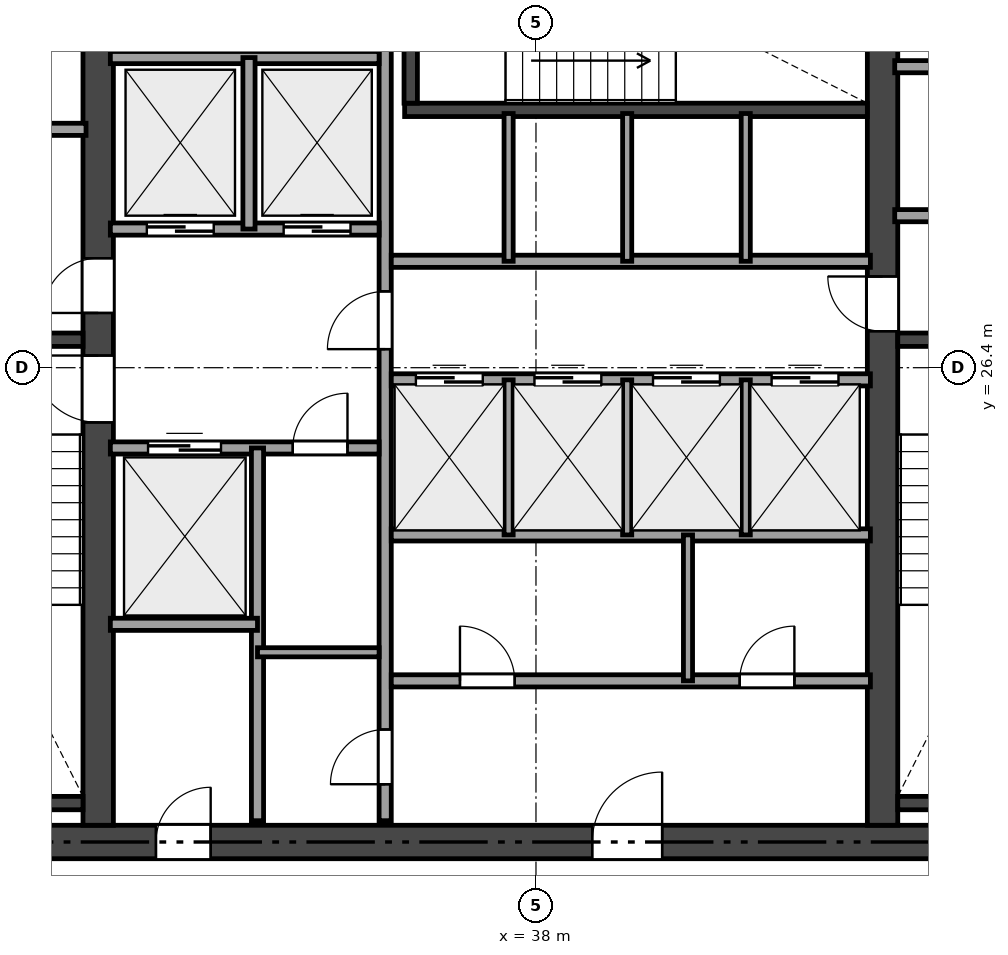
"""IFC4 building model, lengths in metres.
Left out: names, types, materials, properties, quantities, classifications, styles, units other than length and angle.
Written with IfcOpenShell. Run it as: python <this file> out.ifc"""

import sys

from ifc_helpers import new_model, si_unit, direction, frame, frame_2d, origin, place, context, subcontext, project, spatial, rectangle, extrude, element, fill, save


model = new_model("IFC4")
c1 = context("Model", 3, precision=1e-05, world=origin(), true_north=direction((0.0, 1.0)))
c2 = subcontext(c1, "Body", "Model", "MODEL_VIEW")
j1 = project(units=[si_unit("LENGTHUNIT", "METRE"), si_unit("PLANEANGLEUNIT", "RADIAN")], contexts=[c1])
p1 = place(None, origin())
s1 = spatial("IfcSite", under=j1, at=p1, CompositionType="ELEMENT")
p2 = place(p1, origin())
s2 = spatial("IfcBuilding", under=s1, at=p2, CompositionType="ELEMENT")
p3 = place(p2, frame((0.0, 0.0, 177.0)))
s3 = spatial("IfcBuildingStorey", under=s2, at=p3, CompositionType="ELEMENT", Elevation=177.0)
p4 = place(p3, frame((26.525, 18.6, 0.0), z_axis=(0.0, 0.0, 1.0), x_axis=(1.0, 0.0, 0.0)))
e1 = element("IfcWall", 1, at=p4, inside=s3, PredefinedType="SHEAR", context=c2, shape_type="SweptSolid", body=[
    extrude(rectangle(XDim=21.35, YDim=0.55, at=frame_2d((10.675, 0.0))), origin(), (0.0, 0.0, 1.0), 3.32),
])
p5 = place(p4, frame((12.4, 0.0, 0.0)))
e2 = element("IfcOpeningElement", 2, at=p5, cuts=e1, PredefinedType="OPENING", context=c2, shape_type="SweptSolid", body=[
    extrude(rectangle(XDim=1.15, YDim=2.15, at=frame_2d((0.575, 1.075))), frame((0.0, 0.285, 0.0), z_axis=(0.0, -1.0, 0.0), x_axis=(1.0, 0.0, 0.0)), (0.0, 0.0, 1.0), 0.57),
])
p6 = place(p4, frame((5.225, 0.0, 0.0)))
e3 = element("IfcOpeningElement", 3, at=p6, cuts=e1, PredefinedType="OPENING", context=c2, shape_type="SweptSolid", body=[
    extrude(rectangle(XDim=0.9, YDim=2.1, at=frame_2d((0.45, 1.05))), frame((0.0, 0.285, 0.0), z_axis=(0.0, -1.0, 0.0), x_axis=(1.0, 0.0, 0.0)), (0.0, 0.0, 1.0), 0.57),
])
p7 = place(p3, frame((30.8, 18.875, 0.0), z_axis=(0.0, 0.0, 1.0), x_axis=(0.0, 1.0, 0.0)))
e4 = element("IfcWall", 4, at=p7, inside=s3, PredefinedType="SHEAR", context=c2, shape_type="SweptSolid", body=[
    extrude(rectangle(XDim=15.05, YDim=0.5, at=frame_2d((7.525, 0.0))), origin(), (0.0, 0.0, 1.0), 3.32),
])
p8 = place(p7, frame((6.625, 0.0, 0.0)))
e5 = element("IfcOpeningElement", 5, at=p8, cuts=e4, PredefinedType="OPENING", context=c2, shape_type="SweptSolid", body=[
    extrude(rectangle(XDim=1.1, YDim=2.15, at=frame_2d((0.55, 1.075))), frame((0.0, 0.26, 0.0), z_axis=(0.0, -1.0, 0.0), x_axis=(1.0, 0.0, 0.0)), (0.0, 0.0, 1.0), 0.52),
])
p9 = place(p7, frame((8.425, 0.0, 0.0)))
e6 = element("IfcOpeningElement", 6, at=p9, cuts=e4, PredefinedType="OPENING", context=c2, shape_type="SweptSolid", body=[
    extrude(rectangle(XDim=0.9, YDim=2.1, at=frame_2d((0.45, 1.05))), frame((0.0, 0.26, 0.0), z_axis=(0.0, -1.0, 0.0), x_axis=(1.0, 0.0, 0.0)), (0.0, 0.0, 1.0), 0.52),
])
p10 = place(p3, frame((43.7, 18.875, 0.0), z_axis=(0.0, 0.0, 1.0), x_axis=(0.0, 1.0, 0.0)))
e7 = element("IfcWall", 7, at=p10, inside=s3, PredefinedType="SHEAR", context=c2, shape_type="SweptSolid", body=[
    extrude(rectangle(XDim=15.05, YDim=0.5, at=frame_2d((7.525, 0.0))), origin(), (0.0, 0.0, 1.0), 3.32),
])
p11 = place(p10, frame((8.125, 0.0, 0.0)))
e8 = element("IfcOpeningElement", 8, at=p11, cuts=e7, PredefinedType="OPENING", context=c2, shape_type="SweptSolid", body=[
    extrude(rectangle(XDim=0.9, YDim=2.1, at=frame_2d((0.45, 1.05))), frame((0.0, 0.26, 0.0), z_axis=(0.0, -1.0, 0.0), x_axis=(1.0, 0.0, 0.0)), (0.0, 0.0, 1.0), 0.52),
])
for number, where, z_axis, x_axis in (
    (9, (27.075, 26.86, 0.0), (0.0, 0.0, 1.0), (1.0, 0.0, 0.0)),
    (10, (27.075, 19.24, 0.0), (0.0, 0.0, 1.0), (1.0, 0.0, 0.0)),
):
    element("IfcWall", number, at=place(p3, frame(where, z_axis=z_axis, x_axis=x_axis)), inside=s3, PredefinedType="SHEAR", context=c2, shape_type="SweptSolid", body=[
        extrude(rectangle(XDim=3.475, YDim=0.22, at=frame_2d((1.738, 0.0))), origin(), (0.0, 0.0, 1.0), 3.32),
    ])
for number, where, z_axis, x_axis in (
    (11, (43.95, 26.86, 0.0), (0.0, 0.0, 1.0), (1.0, 0.0, 0.0)),
    (12, (43.95, 19.24, 0.0), (0.0, 0.0, 1.0), (1.0, 0.0, 0.0)),
):
    element("IfcWall", number, at=place(p3, frame(where, z_axis=z_axis, x_axis=x_axis)), inside=s3, PredefinedType="SHEAR", context=c2, shape_type="SweptSolid", body=[
        extrude(rectangle(XDim=3.375, YDim=0.22, at=frame_2d((1.688, 0.0))), origin(), (0.0, 0.0, 1.0), 3.32),
    ])
p12 = place(p3, frame((35.84, 30.64, 0.0), z_axis=(0.0, 0.0, 1.0), x_axis=(1.0, 0.0, 0.0)))
e13 = element("IfcWall", 13, at=p12, inside=s3, PredefinedType="SHEAR", context=c2, shape_type="SweptSolid", body=[
    extrude(rectangle(XDim=7.61, YDim=0.22, at=frame_2d((3.805, 0.0))), origin(), (0.0, 0.0, 1.0), 3.32),
])
p13 = place(p3, frame((35.94, 30.75, 0.0), z_axis=(0.0, 0.0, 1.0), x_axis=(0.0, 1.0, 0.0)))
e14 = element("IfcWall", 14, at=p13, inside=s3, PredefinedType="SHEAR", context=c2, shape_type="SweptSolid", body=[
    extrude(rectangle(XDim=3.175, YDim=0.22, at=frame_2d((1.587, 0.0))), origin(), (0.0, 0.0, 1.0), 3.32),
])
p14 = place(p3, frame((27.15, 30.32, 0.0), z_axis=(0.0, 0.0, 1.0), x_axis=(1.0, 0.0, 0.0)))
e15 = element("IfcWall", 15, at=p14, inside=s3, PredefinedType="SOLIDWALL", context=c2, shape_type="SweptSolid", body=[
    extrude(rectangle(XDim=3.45, YDim=0.2, at=frame_2d((1.725, 0.0))), origin(), (0.0, 0.0, 1.0), 3.32),
])
p15 = place(p3, frame((43.9, 28.9, 0.0), z_axis=(0.0, 0.0, 1.0), x_axis=(1.0, 0.0, 0.0)))
e16 = element("IfcWall", 16, at=p15, inside=s3, PredefinedType="SOLIDWALL", context=c2, shape_type="SweptSolid", body=[
    extrude(rectangle(XDim=3.35, YDim=0.2, at=frame_2d((1.675, 0.0))), origin(), (0.0, 0.0, 1.0), 3.32),
])
p16 = place(p15, frame((1.15, 0.0, 0.0)))
e17 = element("IfcOpeningElement", 17, at=p16, cuts=e16, PredefinedType="OPENING", context=c2, shape_type="SweptSolid", body=[
    extrude(rectangle(XDim=0.9, YDim=2.1, at=frame_2d((0.45, 1.05))), frame((0.0, 0.11, 0.0), z_axis=(0.0, -1.0, 0.0), x_axis=(1.0, 0.0, 0.0)), (0.0, 0.0, 1.0), 0.22),
])
p17 = place(p3, frame((43.9, 31.35, 0.0), z_axis=(0.0, 0.0, 1.0), x_axis=(1.0, 0.0, 0.0)))
e18 = element("IfcWall", 18, at=p17, inside=s3, PredefinedType="SOLIDWALL", context=c2, shape_type="SweptSolid", body=[
    extrude(rectangle(XDim=3.35, YDim=0.2, at=frame_2d((1.675, 0.0))), origin(), (0.0, 0.0, 1.0), 3.32),
])
p18 = place(p3, frame((35.52, 18.95, 0.0), z_axis=(0.0, 0.0, 1.0), x_axis=(0.0, 1.0, 0.0)))
e19 = element("IfcWall", 19, at=p18, inside=s3, PredefinedType="SOLIDWALL", context=c2, shape_type="SweptSolid", body=[
    extrude(rectangle(XDim=14.9, YDim=0.2, at=frame_2d((7.45, 0.0))), origin(), (0.0, 0.0, 1.0), 2.841),
])
p19 = place(p18, frame((7.755, 0.0, 0.0)))
e20 = element("IfcOpeningElement", 20, at=p19, cuts=e19, PredefinedType="OPENING", context=c2, shape_type="SweptSolid", body=[
    extrude(rectangle(XDim=0.95, YDim=2.15, at=frame_2d((0.475, 1.075))), frame((0.0, 0.11, 0.0), z_axis=(0.0, -1.0, 0.0), x_axis=(1.0, 0.0, 0.0)), (0.0, 0.0, 1.0), 0.22),
])
p20 = place(p18, frame((0.6, 0.0, 0.0)))
e21 = element("IfcOpeningElement", 21, at=p20, cuts=e19, PredefinedType="OPENING", context=c2, shape_type="SweptSolid", body=[
    extrude(rectangle(XDim=0.9, YDim=2.1, at=frame_2d((0.45, 1.05))), frame((0.0, 0.11, 0.0), z_axis=(0.0, -1.0, 0.0), x_axis=(1.0, 0.0, 0.0)), (0.0, 0.0, 1.0), 0.22),
])
p21 = place(p3, frame((31.0, 28.68, 0.0), z_axis=(0.0, 0.0, 1.0), x_axis=(1.0, 0.0, 0.0)))
e22 = element("IfcWall", 22, at=p21, inside=s3, PredefinedType="SOLIDWALL", context=c2, shape_type="SweptSolid", body=[
    extrude(rectangle(XDim=4.42, YDim=0.2, at=frame_2d((2.21, 0.0))), origin(), (0.0, 0.0, 1.0), 3.32),
])
p22 = place(p21, frame((0.6, 0.0, 0.0)))
e23 = element("IfcOpeningElement", 23, at=p22, cuts=e22, PredefinedType="OPENING", context=c2, shape_type="SweptSolid", body=[
    extrude(rectangle(XDim=1.1, YDim=2.15, at=frame_2d((0.55, 1.075))), frame((0.0, 0.11, 0.0), z_axis=(0.0, -1.0, 0.0), x_axis=(1.0, 0.0, 0.0)), (0.0, 0.0, 1.0), 0.22),
])
p23 = place(p21, frame((2.85, 0.0, 0.0)))
e24 = element("IfcOpeningElement", 24, at=p23, cuts=e22, PredefinedType="OPENING", context=c2, shape_type="SweptSolid", body=[
    extrude(rectangle(XDim=1.1, YDim=2.15, at=frame_2d((0.55, 1.075))), frame((0.0, 0.11, 0.0), z_axis=(0.0, -1.0, 0.0), x_axis=(1.0, 0.0, 0.0)), (0.0, 0.0, 1.0), 0.22),
])
p24 = place(p3, frame((31.0, 31.5, 0.0), z_axis=(0.0, 0.0, 1.0), x_axis=(1.0, 0.0, 0.0)))
e25 = element("IfcWall", 25, at=p24, inside=s3, PredefinedType="SOLIDWALL", context=c2, shape_type="SweptSolid", body=[
    extrude(rectangle(XDim=4.42, YDim=0.2, at=frame_2d((2.21, 0.0))), origin(), (0.0, 0.0, 1.0), 3.32),
])
p25 = place(p3, frame((33.28, 28.68, 0.0), z_axis=(0.0, 0.0, 1.0), x_axis=(0.0, 1.0, 0.0)))
e26 = element("IfcWall", 26, at=p25, inside=s3, PredefinedType="SOLIDWALL", context=c2, shape_type="SweptSolid", body=[
    extrude(rectangle(XDim=2.82, YDim=0.2, at=frame_2d((1.41, 0.0))), origin(), (0.0, 0.0, 1.0), 3.32),
])
p26 = place(p3, frame((31.0, 25.08, 0.0), z_axis=(0.0, 0.0, 1.0), x_axis=(1.0, 0.0, 0.0)))
e27 = element("IfcWall", 27, at=p26, inside=s3, PredefinedType="SOLIDWALL", context=c2, shape_type="SweptSolid", body=[
    extrude(rectangle(XDim=4.42, YDim=0.2, at=frame_2d((2.21, 0.0))), origin(), (0.0, 0.0, 1.0), 3.32),
])
p27 = place(p26, frame((3.0, 0.0, 0.0)))
e28 = element("IfcOpeningElement", 28, at=p27, cuts=e27, PredefinedType="OPENING", context=c2, shape_type="SweptSolid", body=[
    extrude(rectangle(XDim=0.9, YDim=2.1, at=frame_2d((0.45, 1.05))), frame((0.0, 0.11, 0.0), z_axis=(0.0, -1.0, 0.0), x_axis=(1.0, 0.0, 0.0)), (0.0, 0.0, 1.0), 0.22),
])
p28 = place(p26, frame((0.62, 0.0, 0.0)))
e29 = element("IfcOpeningElement", 29, at=p28, cuts=e27, PredefinedType="OPENING", context=c2, shape_type="SweptSolid", body=[
    extrude(rectangle(XDim=1.2, YDim=2.15, at=frame_2d((0.6, 1.075))), frame((0.0, 0.11, 0.0), z_axis=(0.0, -1.0, 0.0), x_axis=(1.0, 0.0, 0.0)), (0.0, 0.0, 1.0), 0.22),
])
p29 = place(p3, frame((33.42, 18.95, 0.0), z_axis=(0.0, 0.0, 1.0), x_axis=(0.0, 1.0, 0.0)))
e30 = element("IfcWall", 30, at=p29, inside=s3, PredefinedType="SOLIDWALL", context=c2, shape_type="SweptSolid", body=[
    extrude(rectangle(XDim=6.13, YDim=0.2, at=frame_2d((3.065, 0.0))), origin(), (0.0, 0.0, 1.0), 2.841),
])
p30 = place(p3, frame((31.0, 22.18, 0.0), z_axis=(0.0, 0.0, 1.0), x_axis=(1.0, 0.0, 0.0)))
e31 = element("IfcWall", 31, at=p30, inside=s3, PredefinedType="SOLIDWALL", context=c2, shape_type="SweptSolid", body=[
    extrude(rectangle(XDim=2.42, YDim=0.2, at=frame_2d((1.21, 0.0))), origin(), (0.0, 0.0, 1.0), 3.32),
])
p31 = place(p3, frame((33.42, 21.72, 0.0), z_axis=(0.0, 0.0, 1.0), x_axis=(1.0, 0.0, 0.0)))
e32 = element("IfcWall", 32, at=p31, inside=s3, PredefinedType="PARTITIONING", context=c2, shape_type="SweptSolid", body=[
    extrude(rectangle(XDim=2.0, YDim=0.15, at=frame_2d((1.0, 0.0))), origin(), (0.0, 0.0, 1.0), 3.32),
])
p32 = place(p3, frame((35.62, 28.15, 0.0), z_axis=(0.0, 0.0, 1.0), x_axis=(1.0, 0.0, 0.0)))
e33 = element("IfcWall", 33, at=p32, inside=s3, PredefinedType="SOLIDWALL", context=c2, shape_type="SweptSolid", body=[
    extrude(rectangle(XDim=7.88, YDim=0.2, at=frame_2d((3.94, 0.0))), origin(), (0.0, 0.0, 1.0), 3.32),
])
p33 = place(p3, frame((35.62, 26.2, 0.0), z_axis=(0.0, 0.0, 1.0), x_axis=(1.0, 0.0, 0.0)))
e34 = element("IfcWall", 34, at=p33, inside=s3, PredefinedType="SOLIDWALL", context=c2, shape_type="SweptSolid", body=[
    extrude(rectangle(XDim=7.88, YDim=0.2, at=frame_2d((3.94, 0.0))), origin(), (0.0, 0.0, 1.0), 3.32),
])
p34 = place(p33, frame((0.405, 0.0, 0.0)))
e35 = element("IfcOpeningElement", 35, at=p34, cuts=e34, PredefinedType="OPENING", context=c2, shape_type="SweptSolid", body=[
    extrude(rectangle(XDim=1.1, YDim=2.15, at=frame_2d((0.55, 1.075))), frame((0.0, 0.11, 0.0), z_axis=(0.0, -1.0, 0.0), x_axis=(1.0, 0.0, 0.0)), (0.0, 0.0, 1.0), 0.22),
])
p35 = place(p33, frame((2.355, 0.0, 0.0)))
e36 = element("IfcOpeningElement", 36, at=p35, cuts=e34, PredefinedType="OPENING", context=c2, shape_type="SweptSolid", body=[
    extrude(rectangle(XDim=1.1, YDim=2.15, at=frame_2d((0.55, 1.075))), frame((0.0, 0.11, 0.0), z_axis=(0.0, -1.0, 0.0), x_axis=(1.0, 0.0, 0.0)), (0.0, 0.0, 1.0), 0.22),
])
p36 = place(p33, frame((4.305, 0.0, 0.0)))
e37 = element("IfcOpeningElement", 37, at=p36, cuts=e34, PredefinedType="OPENING", context=c2, shape_type="SweptSolid", body=[
    extrude(rectangle(XDim=1.1, YDim=2.15, at=frame_2d((0.55, 1.075))), frame((0.0, 0.11, 0.0), z_axis=(0.0, -1.0, 0.0), x_axis=(1.0, 0.0, 0.0)), (0.0, 0.0, 1.0), 0.22),
])
p37 = place(p33, frame((6.255, 0.0, 0.0)))
e38 = element("IfcOpeningElement", 38, at=p37, cuts=e34, PredefinedType="OPENING", context=c2, shape_type="SweptSolid", body=[
    extrude(rectangle(XDim=1.1, YDim=2.15, at=frame_2d((0.55, 1.075))), frame((0.0, 0.11, 0.0), z_axis=(0.0, -1.0, 0.0), x_axis=(1.0, 0.0, 0.0)), (0.0, 0.0, 1.0), 0.22),
])
p38 = place(p3, frame((35.62, 23.65, 0.0), z_axis=(0.0, 0.0, 1.0), x_axis=(1.0, 0.0, 0.0)))
e39 = element("IfcWall", 39, at=p38, inside=s3, PredefinedType="SOLIDWALL", context=c2, shape_type="SweptSolid", body=[
    extrude(rectangle(XDim=7.88, YDim=0.2, at=frame_2d((3.94, 0.0))), origin(), (0.0, 0.0, 1.0), 2.841),
])
p39 = place(p3, frame((35.62, 21.25, 0.0), z_axis=(0.0, 0.0, 1.0), x_axis=(1.0, 0.0, 0.0)))
e40 = element("IfcWall", 40, at=p39, inside=s3, PredefinedType="SOLIDWALL", context=c2, shape_type="SweptSolid", body=[
    extrude(rectangle(XDim=7.88, YDim=0.2, at=frame_2d((3.94, 0.0))), origin(), (0.0, 0.0, 1.0), 3.32),
])
p40 = place(p39, frame((1.13, 0.0, 0.0)))
e41 = element("IfcOpeningElement", 41, at=p40, cuts=e40, PredefinedType="OPENING", context=c2, shape_type="SweptSolid", body=[
    extrude(rectangle(XDim=0.9, YDim=2.1, at=frame_2d((0.45, 1.05))), frame((0.0, 0.11, 0.0), z_axis=(0.0, -1.0, 0.0), x_axis=(1.0, 0.0, 0.0)), (0.0, 0.0, 1.0), 0.22),
])
p41 = place(p39, frame((5.73, 0.0, 0.0)))
e42 = element("IfcOpeningElement", 42, at=p41, cuts=e40, PredefinedType="OPENING", context=c2, shape_type="SweptSolid", body=[
    extrude(rectangle(XDim=0.9, YDim=2.1, at=frame_2d((0.45, 1.05))), frame((0.0, 0.11, 0.0), z_axis=(0.0, -1.0, 0.0), x_axis=(1.0, 0.0, 0.0)), (0.0, 0.0, 1.0), 0.22),
])
for number, where, z_axis, x_axis in (
    (43, (37.55, 28.15, 0.0), (0.0, 0.0, 1.0), (0.0, 1.0, 0.0)),
    (44, (39.5, 28.15, 0.0), (0.0, 0.0, 1.0), (0.0, 1.0, 0.0)),
    (45, (41.45, 28.15, 0.0), (0.0, 0.0, 1.0), (0.0, 1.0, 0.0)),
):
    element("IfcWall", number, at=place(p3, frame(where, z_axis=z_axis, x_axis=x_axis)), inside=s3, PredefinedType="PARTITIONING", context=c2, shape_type="SweptSolid", body=[
        extrude(rectangle(XDim=2.43, YDim=0.15, at=frame_2d((1.215, 0.0))), origin(), (0.0, 0.0, 1.0), 3.32),
    ])
for number, where, z_axis, x_axis in (
    (46, (37.55, 23.65, 0.0), (0.0, 0.0, 1.0), (0.0, 1.0, 0.0)),
    (47, (39.5, 23.65, 0.0), (0.0, 0.0, 1.0), (0.0, 1.0, 0.0)),
    (48, (41.45, 23.65, 0.0), (0.0, 0.0, 1.0), (0.0, 1.0, 0.0)),
):
    element("IfcWall", number, at=place(p3, frame(where, z_axis=z_axis, x_axis=x_axis)), inside=s3, PredefinedType="PARTITIONING", context=c2, shape_type="SweptSolid", body=[
        extrude(rectangle(XDim=2.55, YDim=0.15, at=frame_2d((1.275, 0.0))), origin(), (0.0, 0.0, 1.0), 2.841),
    ])
p42 = place(p3, frame((40.5, 21.25, 0.0), z_axis=(0.0, 0.0, 1.0), x_axis=(0.0, 1.0, 0.0)))
e49 = element("IfcWall", 49, at=p42, inside=s3, PredefinedType="PARTITIONING", context=c2, shape_type="SweptSolid", body=[
    extrude(rectangle(XDim=2.4, YDim=0.15, at=frame_2d((1.2, 0.0))), origin(), (0.0, 0.0, 1.0), 2.841),
])
p43 = place(p8, origin())
e50 = element("IfcDoor", 50, at=p43, inside=s3, OperationType="SINGLE_SWING_RIGHT", PredefinedType="DOOR", context=c2, shape_type="SweptSolid", body=[
    extrude(rectangle(XDim=1.1, YDim=2.15, at=frame_2d((0.55, 1.075))), frame((0.0, 0.025, 0.0), z_axis=(0.0, -1.0, 0.0), x_axis=(1.0, 0.0, 0.0)), (0.0, 0.0, 1.0), 0.05),
])
fill(e5, e50)
p44 = place(p19, origin())
e51 = element("IfcDoor", 51, at=p44, inside=s3, OperationType="SINGLE_SWING_LEFT", PredefinedType="DOOR", context=c2, shape_type="SweptSolid", body=[
    extrude(rectangle(XDim=0.95, YDim=2.15, at=frame_2d((0.475, 1.075))), frame((0.0, 0.025, 0.0), z_axis=(0.0, -1.0, 0.0), x_axis=(1.0, 0.0, 0.0)), (0.0, 0.0, 1.0), 0.05),
])
fill(e20, e51)
p45 = place(p11, origin())
e52 = element("IfcDoor", 52, at=p45, inside=s3, OperationType="SINGLE_SWING_RIGHT", PredefinedType="DOOR", context=c2, shape_type="SweptSolid", body=[
    extrude(rectangle(XDim=0.9, YDim=2.1, at=frame_2d((0.45, 1.05))), frame((0.0, 0.025, 0.0), z_axis=(0.0, -1.0, 0.0), x_axis=(1.0, 0.0, 0.0)), (0.0, 0.0, 1.0), 0.05),
])
fill(e8, e52)
p46 = place(p5, origin())
e53 = element("IfcDoor", 53, at=p46, inside=s3, OperationType="SINGLE_SWING_RIGHT", PredefinedType="DOOR", context=c2, shape_type="SweptSolid", body=[
    extrude(rectangle(XDim=1.15, YDim=2.15, at=frame_2d((0.575, 1.075))), frame((0.0, 0.025, 0.0), z_axis=(0.0, -1.0, 0.0), x_axis=(1.0, 0.0, 0.0)), (0.0, 0.0, 1.0), 0.05),
])
fill(e2, e53)
p47 = place(p9, origin())
e54 = element("IfcDoor", 54, at=p47, inside=s3, OperationType="SINGLE_SWING_LEFT", PredefinedType="DOOR", context=c2, shape_type="SweptSolid", body=[
    extrude(rectangle(XDim=0.9, YDim=2.1, at=frame_2d((0.45, 1.05))), frame((0.0, 0.025, 0.0), z_axis=(0.0, -1.0, 0.0), x_axis=(1.0, 0.0, 0.0)), (0.0, 0.0, 1.0), 0.05),
])
fill(e6, e54)
p48 = place(p6, origin())
e55 = element("IfcDoor", 55, at=p48, inside=s3, OperationType="SINGLE_SWING_RIGHT", PredefinedType="DOOR", context=c2, shape_type="SweptSolid", body=[
    extrude(rectangle(XDim=0.9, YDim=2.1, at=frame_2d((0.45, 1.05))), frame((0.0, 0.025, 0.0), z_axis=(0.0, -1.0, 0.0), x_axis=(1.0, 0.0, 0.0)), (0.0, 0.0, 1.0), 0.05),
])
fill(e3, e55)
p49 = place(p20, origin())
e56 = element("IfcDoor", 56, at=p49, inside=s3, OperationType="SINGLE_SWING_LEFT", PredefinedType="DOOR", context=c2, shape_type="SweptSolid", body=[
    extrude(rectangle(XDim=0.9, YDim=2.1, at=frame_2d((0.45, 1.05))), frame((0.0, 0.025, 0.0), z_axis=(0.0, -1.0, 0.0), x_axis=(1.0, 0.0, 0.0)), (0.0, 0.0, 1.0), 0.05),
])
fill(e21, e56)
p50 = place(p27, origin())
e57 = element("IfcDoor", 57, at=p50, inside=s3, OperationType="SINGLE_SWING_RIGHT", PredefinedType="DOOR", context=c2, shape_type="SweptSolid", body=[
    extrude(rectangle(XDim=0.9, YDim=2.1, at=frame_2d((0.45, 1.05))), frame((0.0, 0.025, 0.0), z_axis=(0.0, -1.0, 0.0), x_axis=(1.0, 0.0, 0.0)), (0.0, 0.0, 1.0), 0.05),
])
fill(e28, e57)
p51 = place(p40, origin())
e58 = element("IfcDoor", 58, at=p51, inside=s3, OperationType="SINGLE_SWING_LEFT", PredefinedType="DOOR", context=c2, shape_type="SweptSolid", body=[
    extrude(rectangle(XDim=0.9, YDim=2.1, at=frame_2d((0.45, 1.05))), frame((0.0, 0.025, 0.0), z_axis=(0.0, -1.0, 0.0), x_axis=(1.0, 0.0, 0.0)), (0.0, 0.0, 1.0), 0.05),
])
fill(e41, e58)
p52 = place(p41, origin())
e59 = element("IfcDoor", 59, at=p52, inside=s3, OperationType="SINGLE_SWING_RIGHT", PredefinedType="DOOR", context=c2, shape_type="SweptSolid", body=[
    extrude(rectangle(XDim=0.9, YDim=2.1, at=frame_2d((0.45, 1.05))), frame((0.0, 0.025, 0.0), z_axis=(0.0, -1.0, 0.0), x_axis=(1.0, 0.0, 0.0)), (0.0, 0.0, 1.0), 0.05),
])
fill(e42, e59)
p53 = place(p22, origin())
e60 = element("IfcDoor", 60, at=p53, inside=s3, OperationType="SLIDING_TO_LEFT", PredefinedType="DOOR", context=c2, shape_type="SweptSolid", body=[
    extrude(rectangle(XDim=1.1, YDim=2.15, at=frame_2d((0.55, 1.075))), frame((0.0, 0.025, 0.0), z_axis=(0.0, -1.0, 0.0), x_axis=(1.0, 0.0, 0.0)), (0.0, 0.0, 1.0), 0.05),
])
fill(e23, e60)
p54 = place(p23, origin())
e61 = element("IfcDoor", 61, at=p54, inside=s3, OperationType="SLIDING_TO_LEFT", PredefinedType="DOOR", context=c2, shape_type="SweptSolid", body=[
    extrude(rectangle(XDim=1.1, YDim=2.15, at=frame_2d((0.55, 1.075))), frame((0.0, 0.025, 0.0), z_axis=(0.0, -1.0, 0.0), x_axis=(1.0, 0.0, 0.0)), (0.0, 0.0, 1.0), 0.05),
])
fill(e24, e61)
p55 = place(p28, origin())
e62 = element("IfcDoor", 62, at=p55, inside=s3, OperationType="SLIDING_TO_LEFT", PredefinedType="DOOR", context=c2, shape_type="SweptSolid", body=[
    extrude(rectangle(XDim=1.2, YDim=2.15, at=frame_2d((0.6, 1.075))), frame((0.0, 0.025, 0.0), z_axis=(0.0, -1.0, 0.0), x_axis=(1.0, 0.0, 0.0)), (0.0, 0.0, 1.0), 0.05),
])
fill(e29, e62)
p56 = place(p34, origin())
e63 = element("IfcDoor", 63, at=p56, inside=s3, OperationType="SLIDING_TO_LEFT", PredefinedType="DOOR", context=c2, shape_type="SweptSolid", body=[
    extrude(rectangle(XDim=1.1, YDim=2.15, at=frame_2d((0.55, 1.075))), frame((0.0, 0.025, 0.0), z_axis=(0.0, -1.0, 0.0), x_axis=(1.0, 0.0, 0.0)), (0.0, 0.0, 1.0), 0.05),
])
fill(e35, e63)
p57 = place(p35, origin())
e64 = element("IfcDoor", 64, at=p57, inside=s3, OperationType="SLIDING_TO_LEFT", PredefinedType="DOOR", context=c2, shape_type="SweptSolid", body=[
    extrude(rectangle(XDim=1.1, YDim=2.15, at=frame_2d((0.55, 1.075))), frame((0.0, 0.025, 0.0), z_axis=(0.0, -1.0, 0.0), x_axis=(1.0, 0.0, 0.0)), (0.0, 0.0, 1.0), 0.05),
])
fill(e36, e64)
p58 = place(p36, origin())
e65 = element("IfcDoor", 65, at=p58, inside=s3, OperationType="SLIDING_TO_LEFT", PredefinedType="DOOR", context=c2, shape_type="SweptSolid", body=[
    extrude(rectangle(XDim=1.1, YDim=2.15, at=frame_2d((0.55, 1.075))), frame((0.0, 0.025, 0.0), z_axis=(0.0, -1.0, 0.0), x_axis=(1.0, 0.0, 0.0)), (0.0, 0.0, 1.0), 0.05),
])
fill(e37, e65)
p59 = place(p37, origin())
e66 = element("IfcDoor", 66, at=p59, inside=s3, OperationType="SLIDING_TO_LEFT", PredefinedType="DOOR", context=c2, shape_type="SweptSolid", body=[
    extrude(rectangle(XDim=1.1, YDim=2.15, at=frame_2d((0.55, 1.075))), frame((0.0, 0.025, 0.0), z_axis=(0.0, -1.0, 0.0), x_axis=(1.0, 0.0, 0.0)), (0.0, 0.0, 1.0), 0.05),
])
fill(e38, e66)
save(model, sys.argv[1])
